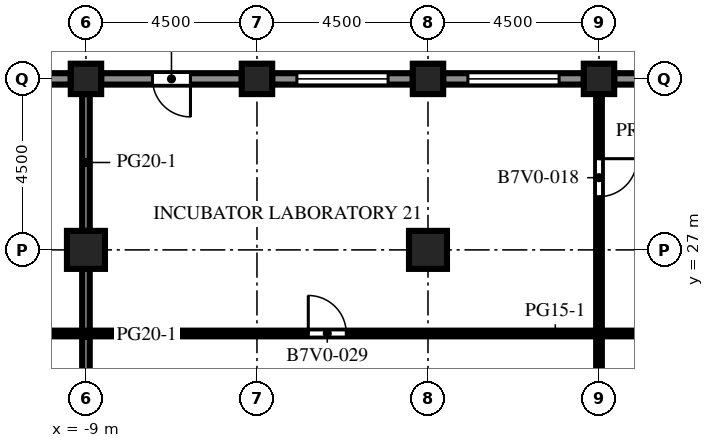
"""IFC4 building model, lengths in metres.
Left out: names, types, materials, properties, quantities, classifications, styles, units other than length and angle.
Written with IfcOpenShell. Run it as: python <this file> out.ifc"""

import sys

from ifc_helpers import new_model, si_unit, direction, frame, frame_2d, origin, origin_2d, place, context, subcontext, project, spatial, rectangle, extrude, element, fill, save


model = new_model("IFC4")
c1 = context("Model", 3, precision=1e-05, world=origin(), true_north=direction((0.0, 1.0)))
c2 = subcontext(c1, "Body", "Model", "MODEL_VIEW")
j1 = project(units=[si_unit("LENGTHUNIT", "METRE"), si_unit("PLANEANGLEUNIT", "RADIAN")], contexts=[c1])
p1 = place(None, origin())
s1 = spatial("IfcSite", under=j1, at=p1, CompositionType="ELEMENT")
p2 = place(p1, origin())
s2 = spatial("IfcBuilding", under=s1, at=p2, CompositionType="ELEMENT")
p3 = place(p2, frame((0.0, 0.0, 235.7)))
s3 = spatial("IfcBuildingStorey", under=s2, at=p3, CompositionType="ELEMENT", Elevation=235.7)
for number, where, z_axis, x_axis in (
    (1, (-9.0, 31.5, 0.0), (0.0, 0.0, 1.0), (1.0, 0.0, 0.0)),
    (2, (-4.5, 31.5, 0.0), (0.0, 0.0, 1.0), (1.0, 0.0, 0.0)),
    (3, (0.0, 31.5, 0.0), (0.0, 0.0, 1.0), (1.0, 0.0, 0.0)),
    (4, (4.5, 31.5, 0.0), (0.0, 0.0, 1.0), (1.0, 0.0, 0.0)),
):
    element("IfcColumn", number, at=place(p3, frame(where, z_axis=z_axis, x_axis=x_axis)), inside=s3, PredefinedType="COLUMN", context=c2, shape_type="SweptSolid", body=[
        extrude(rectangle(XDim=0.8, YDim=0.8, at=origin_2d()), origin(), (0.0, 0.0, 1.0), 4.1),
    ])
for number, where, z_axis, x_axis in (
    (5, (-9.0, 27.0, 0.0), (0.0, 0.0, 1.0), (1.0, 0.0, 0.0)),
    (6, (0.0, 27.0, 0.0), (0.0, 0.0, 1.0), (1.0, 0.0, 0.0)),
):
    element("IfcColumn", number, at=place(p3, frame(where, z_axis=z_axis, x_axis=x_axis)), inside=s3, PredefinedType="COLUMN", context=c2, shape_type="SweptSolid", body=[
        extrude(rectangle(XDim=1.0, YDim=1.0, at=origin_2d()), origin(), (0.0, 0.0, 1.0), 4.1),
    ])
p4 = place(p3, frame((4.9, 31.5, 0.0), z_axis=(0.0, 0.0, 1.0), x_axis=(1.0, 0.0, 0.0)))
e7 = element("IfcWall", 7, at=p4, inside=s3, PredefinedType="SOLIDWALL", context=c2, shape_type="SweptSolid", body=[
    extrude(rectangle(XDim=3.7, YDim=0.3, at=frame_2d((1.85, 0.0))), origin(), (0.0, 0.0, 1.0), 2.85),
])
p5 = place(p4, frame((0.65, 0.0, 0.8)))
e8 = element("IfcOpeningElement", 8, at=p5, cuts=e7, PredefinedType="OPENING", context=c2, shape_type="SweptSolid", body=[
    extrude(rectangle(XDim=2.4, YDim=1.7, at=frame_2d((1.2, 0.85))), frame((0.0, 0.16, 0.0), z_axis=(0.0, -1.0, 0.0), x_axis=(1.0, 0.0, 0.0)), (0.0, 0.0, 1.0), 0.32),
])
p6 = place(p3, frame((0.4, 31.5, 0.0), z_axis=(0.0, 0.0, 1.0), x_axis=(1.0, 0.0, 0.0)))
e9 = element("IfcWall", 9, at=p6, inside=s3, PredefinedType="SOLIDWALL", context=c2, shape_type="SweptSolid", body=[
    extrude(rectangle(XDim=3.7, YDim=0.3, at=frame_2d((1.85, 0.0))), origin(), (0.0, 0.0, 1.0), 2.85),
])
p7 = place(p6, frame((0.65, 0.0, 0.8)))
e10 = element("IfcOpeningElement", 10, at=p7, cuts=e9, PredefinedType="OPENING", context=c2, shape_type="SweptSolid", body=[
    extrude(rectangle(XDim=2.4, YDim=1.7, at=frame_2d((1.2, 0.85))), frame((0.0, 0.16, 0.0), z_axis=(0.0, -1.0, 0.0), x_axis=(1.0, 0.0, 0.0)), (0.0, 0.0, 1.0), 0.32),
])
p8 = place(p3, frame((-4.1, 31.5, 0.0), z_axis=(0.0, 0.0, 1.0), x_axis=(1.0, 0.0, 0.0)))
e11 = element("IfcWall", 11, at=p8, inside=s3, PredefinedType="SOLIDWALL", context=c2, shape_type="SweptSolid", body=[
    extrude(rectangle(XDim=3.7, YDim=0.3, at=frame_2d((1.85, 0.0))), origin(), (0.0, 0.0, 1.0), 2.85),
])
p9 = place(p8, frame((0.65, 0.0, 0.8)))
e12 = element("IfcOpeningElement", 12, at=p9, cuts=e11, PredefinedType="OPENING", context=c2, shape_type="SweptSolid", body=[
    extrude(rectangle(XDim=2.4, YDim=1.7, at=frame_2d((1.2, 0.85))), frame((0.0, 0.16, 0.0), z_axis=(0.0, -1.0, 0.0), x_axis=(1.0, 0.0, 0.0)), (0.0, 0.0, 1.0), 0.32),
])
p10 = place(p3, frame((-8.6, 31.5, 0.0), z_axis=(0.0, 0.0, 1.0), x_axis=(1.0, 0.0, 0.0)))
e13 = element("IfcWall", 13, at=p10, inside=s3, PredefinedType="SOLIDWALL", context=c2, shape_type="SweptSolid", body=[
    extrude(rectangle(XDim=3.7, YDim=0.3, at=frame_2d((1.85, 0.0))), origin(), (0.0, 0.0, 1.0), 2.85),
])
p11 = place(p10, frame((1.35, 0.0, 0.0)))
e14 = element("IfcOpeningElement", 14, at=p11, cuts=e13, PredefinedType="OPENING", context=c2, shape_type="SweptSolid", body=[
    extrude(rectangle(XDim=1.0, YDim=2.2, at=frame_2d((0.5, 1.1))), frame((0.0, 0.16, 0.0), z_axis=(0.0, -1.0, 0.0), x_axis=(1.0, 0.0, 0.0)), (0.0, 0.0, 1.0), 0.32),
])
p12 = place(p3, frame((-13.1, 31.5, 0.0), z_axis=(0.0, 0.0, 1.0), x_axis=(1.0, 0.0, 0.0)))
e15 = element("IfcWall", 15, at=p12, inside=s3, PredefinedType="SOLIDWALL", context=c2, shape_type="SweptSolid", body=[
    extrude(rectangle(XDim=3.7, YDim=0.3, at=frame_2d((1.85, 0.0))), origin(), (0.0, 0.0, 1.0), 2.85),
])
p13 = place(p12, frame((0.65, 0.0, 0.8)))
e16 = element("IfcOpeningElement", 16, at=p13, cuts=e15, PredefinedType="OPENING", context=c2, shape_type="SweptSolid", body=[
    extrude(rectangle(XDim=2.4, YDim=1.7, at=frame_2d((1.2, 0.85))), frame((0.0, 0.16, 0.0), z_axis=(0.0, -1.0, 0.0), x_axis=(1.0, 0.0, 0.0)), (0.0, 0.0, 1.0), 0.32),
])
p14 = place(p3, frame((-9.0, 23.0, 0.0), z_axis=(0.0, 0.0, 1.0), x_axis=(0.0, 1.0, 0.0)))
e17 = element("IfcWall", 17, at=p14, inside=s3, PredefinedType="PARTITIONING", context=c2, shape_type="SweptSolid", body=[
    extrude(rectangle(XDim=3.5, YDim=0.2, at=frame_2d((1.75, 0.0))), origin(), (0.0, 0.0, 1.0), 3.65),
])
p15 = place(p3, frame((-9.0, 27.5, 0.0), z_axis=(0.0, 0.0, 1.0), x_axis=(0.0, 1.0, 0.0)))
e18 = element("IfcWall", 18, at=p15, inside=s3, PredefinedType="PARTITIONING", context=c2, shape_type="SweptSolid", body=[
    extrude(rectangle(XDim=3.6, YDim=0.2, at=frame_2d((1.8, 0.0))), origin(), (0.0, 0.0, 1.0), 3.65),
])
p16 = place(p3, frame((4.5, 31.1, 0.0), z_axis=(0.0, 0.0, 1.0), x_axis=(0.0, -1.0, 0.0)))
e19 = element("IfcWall", 19, at=p16, inside=s3, PredefinedType="PARTITIONING", context=c2, shape_type="SweptSolid", body=[
    extrude(rectangle(XDim=12.6, YDim=0.15, at=frame_2d((6.3, 0.0))), origin(), (0.0, 0.0, 1.0), 3.65),
])
p17 = place(p16, frame((1.7, 0.0, 0.0)))
e20 = element("IfcOpeningElement", 20, at=p17, cuts=e19, PredefinedType="OPENING", context=c2, shape_type="SweptSolid", body=[
    extrude(rectangle(XDim=1.0, YDim=2.1, at=frame_2d((0.5, 1.05))), frame((0.0, 0.085, 0.0), z_axis=(0.0, -1.0, 0.0), x_axis=(1.0, 0.0, 0.0)), (0.0, 0.0, 1.0), 0.17),
])
p18 = place(p3, frame((-13.5, 24.8, 0.0), z_axis=(0.0, 0.0, 1.0), x_axis=(1.0, 0.0, 0.0)))
e21 = element("IfcWall", 21, at=p18, inside=s3, PredefinedType="PARTITIONING", context=c2, shape_type="SweptSolid", body=[
    extrude(rectangle(XDim=34.5, YDim=0.15, at=frame_2d((17.25, 0.0))), origin(), (0.0, 0.0, 1.0), 3.65),
])
p19 = place(p18, frame((1.6, 0.0, 0.0)))
e22 = element("IfcOpeningElement", 22, at=p19, cuts=e21, PredefinedType="OPENING", context=c2, shape_type="SweptSolid", body=[
    extrude(rectangle(XDim=1.0, YDim=2.1, at=frame_2d((0.5, 1.05))), frame((0.0, 0.085, 0.0), z_axis=(0.0, -1.0, 0.0), x_axis=(1.0, 0.0, 0.0)), (0.0, 0.0, 1.0), 0.17),
])
p20 = place(p18, frame((10.35, 0.0, 0.0)))
e23 = element("IfcOpeningElement", 23, at=p20, cuts=e21, PredefinedType="OPENING", context=c2, shape_type="SweptSolid", body=[
    extrude(rectangle(XDim=1.0, YDim=2.1, at=frame_2d((0.5, 1.05))), frame((0.0, 0.085, 0.0), z_axis=(0.0, -1.0, 0.0), x_axis=(1.0, 0.0, 0.0)), (0.0, 0.0, 1.0), 0.17),
])
p21 = place(p18, frame((22.35, 0.0, 0.0)))
e24 = element("IfcOpeningElement", 24, at=p21, cuts=e21, PredefinedType="OPENING", context=c2, shape_type="SweptSolid", body=[
    extrude(rectangle(XDim=1.0, YDim=2.1, at=frame_2d((0.5, 1.05))), frame((0.0, 0.085, 0.0), z_axis=(0.0, -1.0, 0.0), x_axis=(1.0, 0.0, 0.0)), (0.0, 0.0, 1.0), 0.17),
])
p22 = place(p18, frame((31.1, 0.0, 0.0)))
e25 = element("IfcOpeningElement", 25, at=p22, cuts=e21, PredefinedType="OPENING", context=c2, shape_type="SweptSolid", body=[
    extrude(rectangle(XDim=1.0, YDim=2.1, at=frame_2d((0.5, 1.05))), frame((0.0, 0.085, 0.0), z_axis=(0.0, -1.0, 0.0), x_axis=(1.0, 0.0, 0.0)), (0.0, 0.0, 1.0), 0.17),
])
p23 = place(p7, origin())
e26 = element("IfcWindow", 26, at=p23, inside=s3, PartitioningType="SINGLE_PANEL", PredefinedType="WINDOW", context=c2, shape_type="SweptSolid", body=[
    extrude(rectangle(XDim=2.4, YDim=1.7, at=frame_2d((1.2, 0.85))), frame((0.0, 0.03, 0.0), z_axis=(0.0, -1.0, 0.0), x_axis=(1.0, 0.0, 0.0)), (0.0, 0.0, 1.0), 0.06),
])
fill(e10, e26)
p24 = place(p9, origin())
e27 = element("IfcWindow", 27, at=p24, inside=s3, PartitioningType="SINGLE_PANEL", PredefinedType="WINDOW", context=c2, shape_type="SweptSolid", body=[
    extrude(rectangle(XDim=2.4, YDim=1.7, at=frame_2d((1.2, 0.85))), frame((0.0, 0.03, 0.0), z_axis=(0.0, -1.0, 0.0), x_axis=(1.0, 0.0, 0.0)), (0.0, 0.0, 1.0), 0.06),
])
fill(e12, e27)
p25 = place(p11, origin())
e28 = element("IfcDoor", 28, at=p25, inside=s3, OperationType="SINGLE_SWING_RIGHT", PredefinedType="DOOR", context=c2, shape_type="SweptSolid", body=[
    extrude(rectangle(XDim=1.0, YDim=2.2, at=frame_2d((0.5, 1.1))), frame((0.0, 0.025, 0.0), z_axis=(0.0, -1.0, 0.0), x_axis=(1.0, 0.0, 0.0)), (0.0, 0.0, 1.0), 0.05),
])
fill(e14, e28)
p26 = place(p17, origin())
e29 = element("IfcDoor", 29, at=p26, inside=s3, OperationType="SINGLE_SWING_LEFT", PredefinedType="DOOR", context=c2, shape_type="SweptSolid", body=[
    extrude(rectangle(XDim=1.0, YDim=2.1, at=frame_2d((0.5, 1.05))), frame((0.0, 0.025, 0.0), z_axis=(0.0, -1.0, 0.0), x_axis=(1.0, 0.0, 0.0)), (0.0, 0.0, 1.0), 0.05),
])
fill(e20, e29)
p27 = place(p20, origin())
e30 = element("IfcDoor", 30, at=p27, inside=s3, OperationType="SINGLE_SWING_LEFT", PredefinedType="DOOR", context=c2, shape_type="SweptSolid", body=[
    extrude(rectangle(XDim=1.0, YDim=2.1, at=frame_2d((0.5, 1.05))), frame((0.0, 0.025, 0.0), z_axis=(0.0, -1.0, 0.0), x_axis=(1.0, 0.0, 0.0)), (0.0, 0.0, 1.0), 0.05),
])
fill(e23, e30)
save(model, sys.argv[1])
